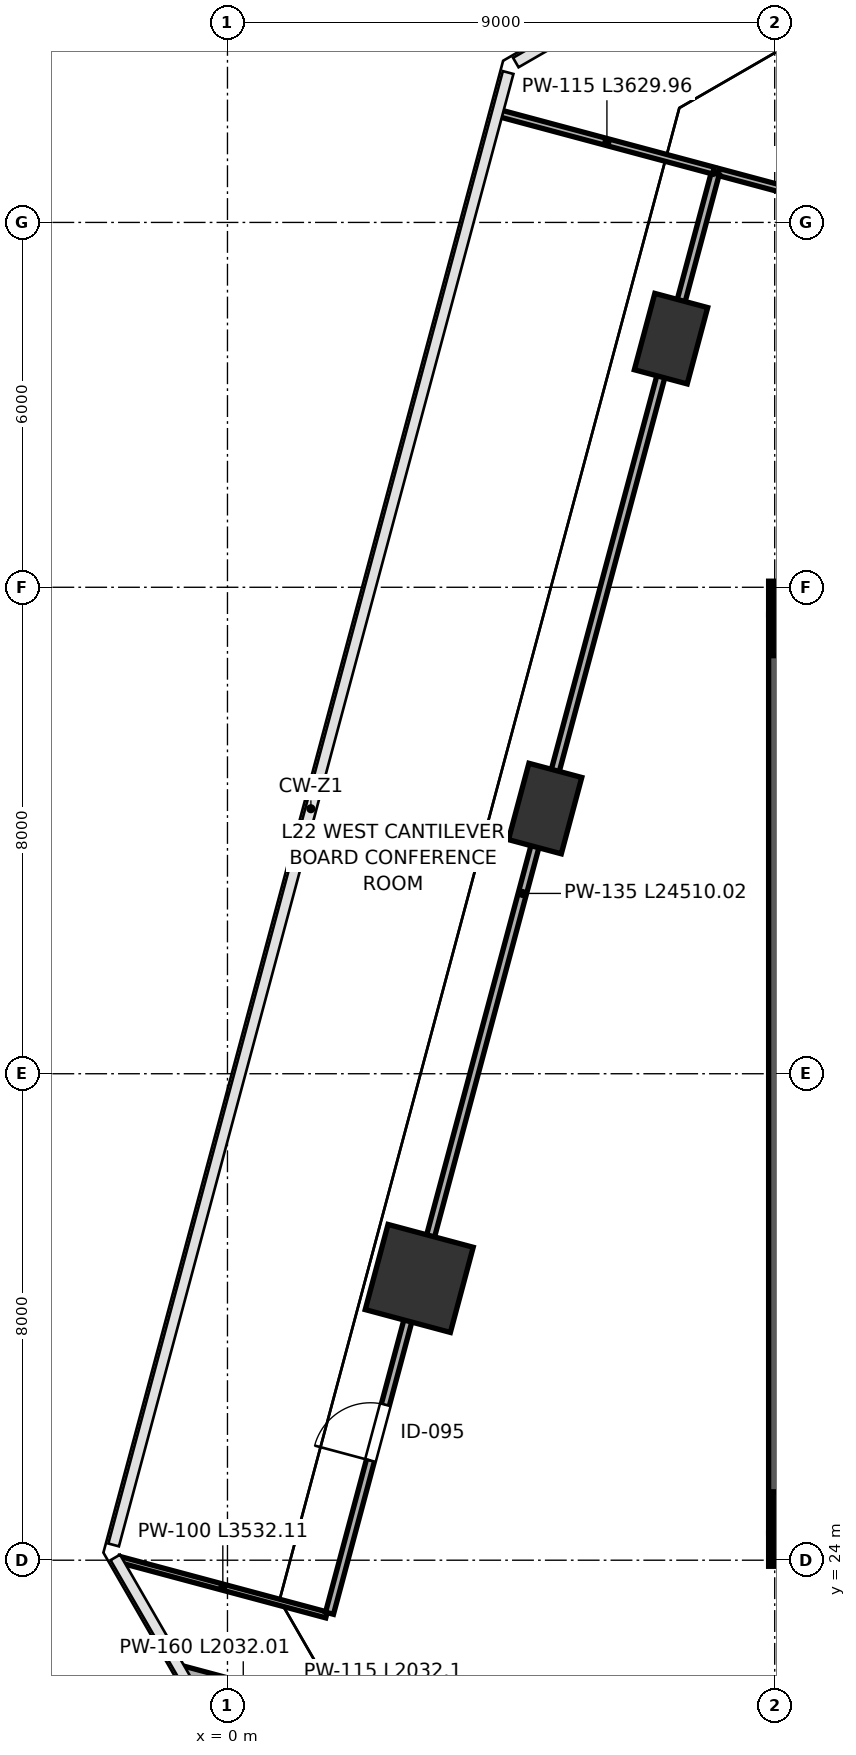
"""IFC4 building model, lengths in metres.
Left out: names, types, materials, properties, quantities, classifications, styles, units other than length and angle.
Written with IfcOpenShell. Run it as: python <this file> out.ifc"""

import sys

from ifc_helpers import new_model, si_unit, direction, frame, frame_2d, origin, origin_2d, place, context, subcontext, project, spatial, rectangle, extrude, source, transform, mapped, element, fill, save


model = new_model("IFC4")
c1 = context("Model", 3, precision=1e-05, world=origin(), true_north=direction((0.0, 1.0)))
c2 = subcontext(c1, "Body", "Model", "MODEL_VIEW")
j1 = project(units=[si_unit("LENGTHUNIT", "METRE"), si_unit("PLANEANGLEUNIT", "RADIAN")], contexts=[c1])
p1 = place(None, origin())
s1 = spatial("IfcSite", under=j1, at=p1, CompositionType="ELEMENT")
p2 = place(p1, origin())
s2 = spatial("IfcBuilding", under=s1, at=p2, CompositionType="ELEMENT")
p3 = place(p2, frame((0.0, 0.0, 100.0)))
s3 = spatial("IfcBuildingStorey", under=s2, at=p3, CompositionType="ELEMENT", Elevation=100.0)
m1 = source(origin(), c2, "Body", "SweptSolid", [
    extrude(rectangle(XDim=1.15, YDim=1.15, at=origin_2d()), origin(), (0.0, 0.0, 1.0), 4.198),
])
for number, where, z_axis, x_axis in (
    (1, (9.55, 24.55, 0.001), (0.0, 0.0, 1.0), (1.0, 0.0, 0.0)),
    (2, (9.55, 39.45, 0.001), (0.0, 0.0, 1.0), (1.0, 0.0, 0.0)),
):
    element("IfcColumn", number, at=place(p3, frame(where, z_axis=z_axis, x_axis=x_axis)), inside=s3, PredefinedType="COLUMN", context=c2, shape_type="MappedRepresentation", body=[
        mapped(m1, transform((0.0, 0.0, 0.0), scale=1.0)),
    ])
m2 = source(origin(), c2, "Body", "SweptSolid", [
    extrude(rectangle(XDim=1.45, YDim=1.45, at=origin_2d()), origin(), (0.0, 0.0, 1.0), 4.198),
])
p4 = place(p3, frame((3.154, 28.634, 0.001), z_axis=(0.0, 0.0, 1.0), x_axis=(-0.965925826289, 0.258819045103, 0.0)))
e3 = element("IfcColumn", 3, at=p4, inside=s3, PredefinedType="COLUMN", context=c2, shape_type="MappedRepresentation", body=[
    mapped(m2, transform((0.0, 0.0, 0.0), scale=1.0)),
])
m3 = source(origin(), c2, "Body", "SweptSolid", [
    extrude(rectangle(XDim=0.9, YDim=1.3, at=origin_2d()), origin(), (0.0, 0.0, 1.0), 4.198),
])
for number, where, z_axis, x_axis in (
    (4, (5.224, 36.361, 0.001), (0.0, 0.0, 1.0), (-0.966, 0.259, 0.0)),
    (5, (7.295, 44.088, 0.001), (0.0, 0.0, 1.0), (-0.966, 0.259, 0.0)),
):
    element("IfcColumn", number, at=place(p3, frame(where, z_axis=z_axis, x_axis=x_axis)), inside=s3, PredefinedType="PILASTER", context=c2, shape_type="MappedRepresentation", body=[
        mapped(m3, transform((0.0, 0.0, 0.0), scale=1.0)),
    ])
p5 = place(p3, frame((9.175, 24.45, 0.0), z_axis=(0.0, 0.0, 1.0), x_axis=(0.0, 1.0, 0.0)))
e6 = element("IfcWall", 6, at=p5, inside=s3, PredefinedType="SHEAR", context=c2, shape_type="SweptSolid", body=[
    extrude(rectangle(XDim=15.1, YDim=0.55, at=frame_2d((7.55, 0.0))), origin(), (0.0, 0.0, 1.0), 3.96),
])
for number, where, z_axis, x_axis in (
    (7, (8.9, 24.175, 0.0), (0.0, 0.0, 1.0), (1.0, 0.0, 0.0)),
    (8, (8.9, 39.825, 0.0), (0.0, 0.0, 1.0), (1.0, 0.0, 0.0)),
):
    element("IfcWall", number, at=place(p3, frame(where, z_axis=z_axis, x_axis=x_axis)), inside=s3, PredefinedType="SHEAR", context=c2, shape_type="SweptSolid", body=[
        extrude(rectangle(XDim=18.2, YDim=0.55, at=frame_2d((9.1, 0.0))), origin(), (0.0, 0.0, 1.0), 3.96),
    ])
p6 = place(p3, frame((-0.722, 22.177, 0.0), z_axis=(0.0, 0.0, 1.0), x_axis=(0.965965207833, -0.258672026426, 0.0)))
e9 = element("IfcWall", 9, at=p6, inside=s3, PredefinedType="PARTITIONING", context=c2, shape_type="SweptSolid", body=[
    extrude(rectangle(XDim=2.032, YDim=0.16, at=frame_2d((1.016, 0.0))), origin(), (0.0, 0.0, 1.0), 3.96),
])
p7 = place(p3, frame((8.071, 46.831, 0.0), z_axis=(0.0, 0.0, 1.0), x_axis=(0.965925848141, -0.258818963551, 0.0)))
e10 = element("IfcWall", 10, at=p7, inside=s3, PredefinedType="PARTITIONING", context=c2, shape_type="SweptSolid", body=[
    extrude(rectangle(XDim=26.16, YDim=0.115, at=frame_2d((13.08, 0.0))), origin(), (0.0, 0.0, 1.0), 3.96),
])
p8 = place(p7, frame((1.05, 0.0, 0.0)))
e11 = element("IfcOpeningElement", 11, at=p8, cuts=e10, PredefinedType="OPENING", context=c2, shape_type="SweptSolid", body=[
    extrude(rectangle(XDim=0.95, YDim=2.15, at=frame_2d((0.475, 1.075))), frame((0.0, 0.067, 0.0), z_axis=(0.0, -1.0, 0.0), x_axis=(1.0, 0.0, 0.0)), (0.0, 0.0, 1.0), 0.135),
])
p9 = place(p3, frame((-1.782, 24.014, 0.0), z_axis=(0.0, 0.0, 1.0), x_axis=(0.965936019953, -0.258780998834, 0.0)))
e12 = element("IfcWall", 12, at=p9, inside=s3, PredefinedType="PARTITIONING", context=c2, shape_type="SweptSolid", body=[
    extrude(rectangle(XDim=3.532, YDim=0.1, at=frame_2d((1.766, 0.0))), origin(), (0.0, 0.0, 1.0), 3.96),
])
p10 = place(p3, frame((1.678, 23.128, 0.0), z_axis=(0.0, 0.0, 1.0), x_axis=(0.258813756198, 0.965927243431, 0.0)))
e13 = element("IfcWall", 13, at=p10, inside=s3, PredefinedType="PARTITIONING", context=c2, shape_type="SweptSolid", body=[
    extrude(rectangle(XDim=24.51, YDim=0.135, at=frame_2d((12.255, 0.0))), origin(), (0.0, 0.0, 1.0), 2.795),
])
p11 = place(p10, frame((2.6, 0.0, 0.0)))
e14 = element("IfcOpeningElement", 14, at=p11, cuts=e13, PredefinedType="OPENING", context=c2, shape_type="SweptSolid", body=[
    extrude(rectangle(XDim=0.95, YDim=2.15, at=frame_2d((0.475, 1.075))), frame((0.0, 0.078, 0.0), z_axis=(0.0, -1.0, 0.0), x_axis=(1.0, 0.0, 0.0)), (0.0, 0.0, 1.0), 0.155),
])
p12 = place(p3, frame((4.487, 47.791, 0.0), z_axis=(0.0, 0.0, 1.0), x_axis=(0.965930639999, -0.258801079426, 0.0)))
e15 = element("IfcWall", 15, at=p12, inside=s3, PredefinedType="PARTITIONING", context=c2, shape_type="SweptSolid", body=[
    extrude(rectangle(XDim=3.63, YDim=0.115, at=frame_2d((1.815, 0.0))), origin(), (0.0, 0.0, 1.0), 3.96),
])
m4 = source(origin(), c2, "Body", "SweptSolid", [
    extrude(rectangle(XDim=0.95, YDim=2.15, at=frame_2d((0.475, 1.075))), frame((0.0, 0.025, 0.0), z_axis=(0.0, -1.0, 0.0), x_axis=(1.0, 0.0, 0.0)), (0.0, 0.0, 1.0), 0.05),
])
p13 = place(p11, origin())
e16 = element("IfcDoor", 16, at=p13, inside=s3, OperationType="SINGLE_SWING_LEFT", PredefinedType="DOOR", context=c2, shape_type="MappedRepresentation", body=[
    mapped(m4, transform((0.0, 0.0, 0.0), scale=1.0)),
])
fill(e14, e16)
save(model, sys.argv[1])
